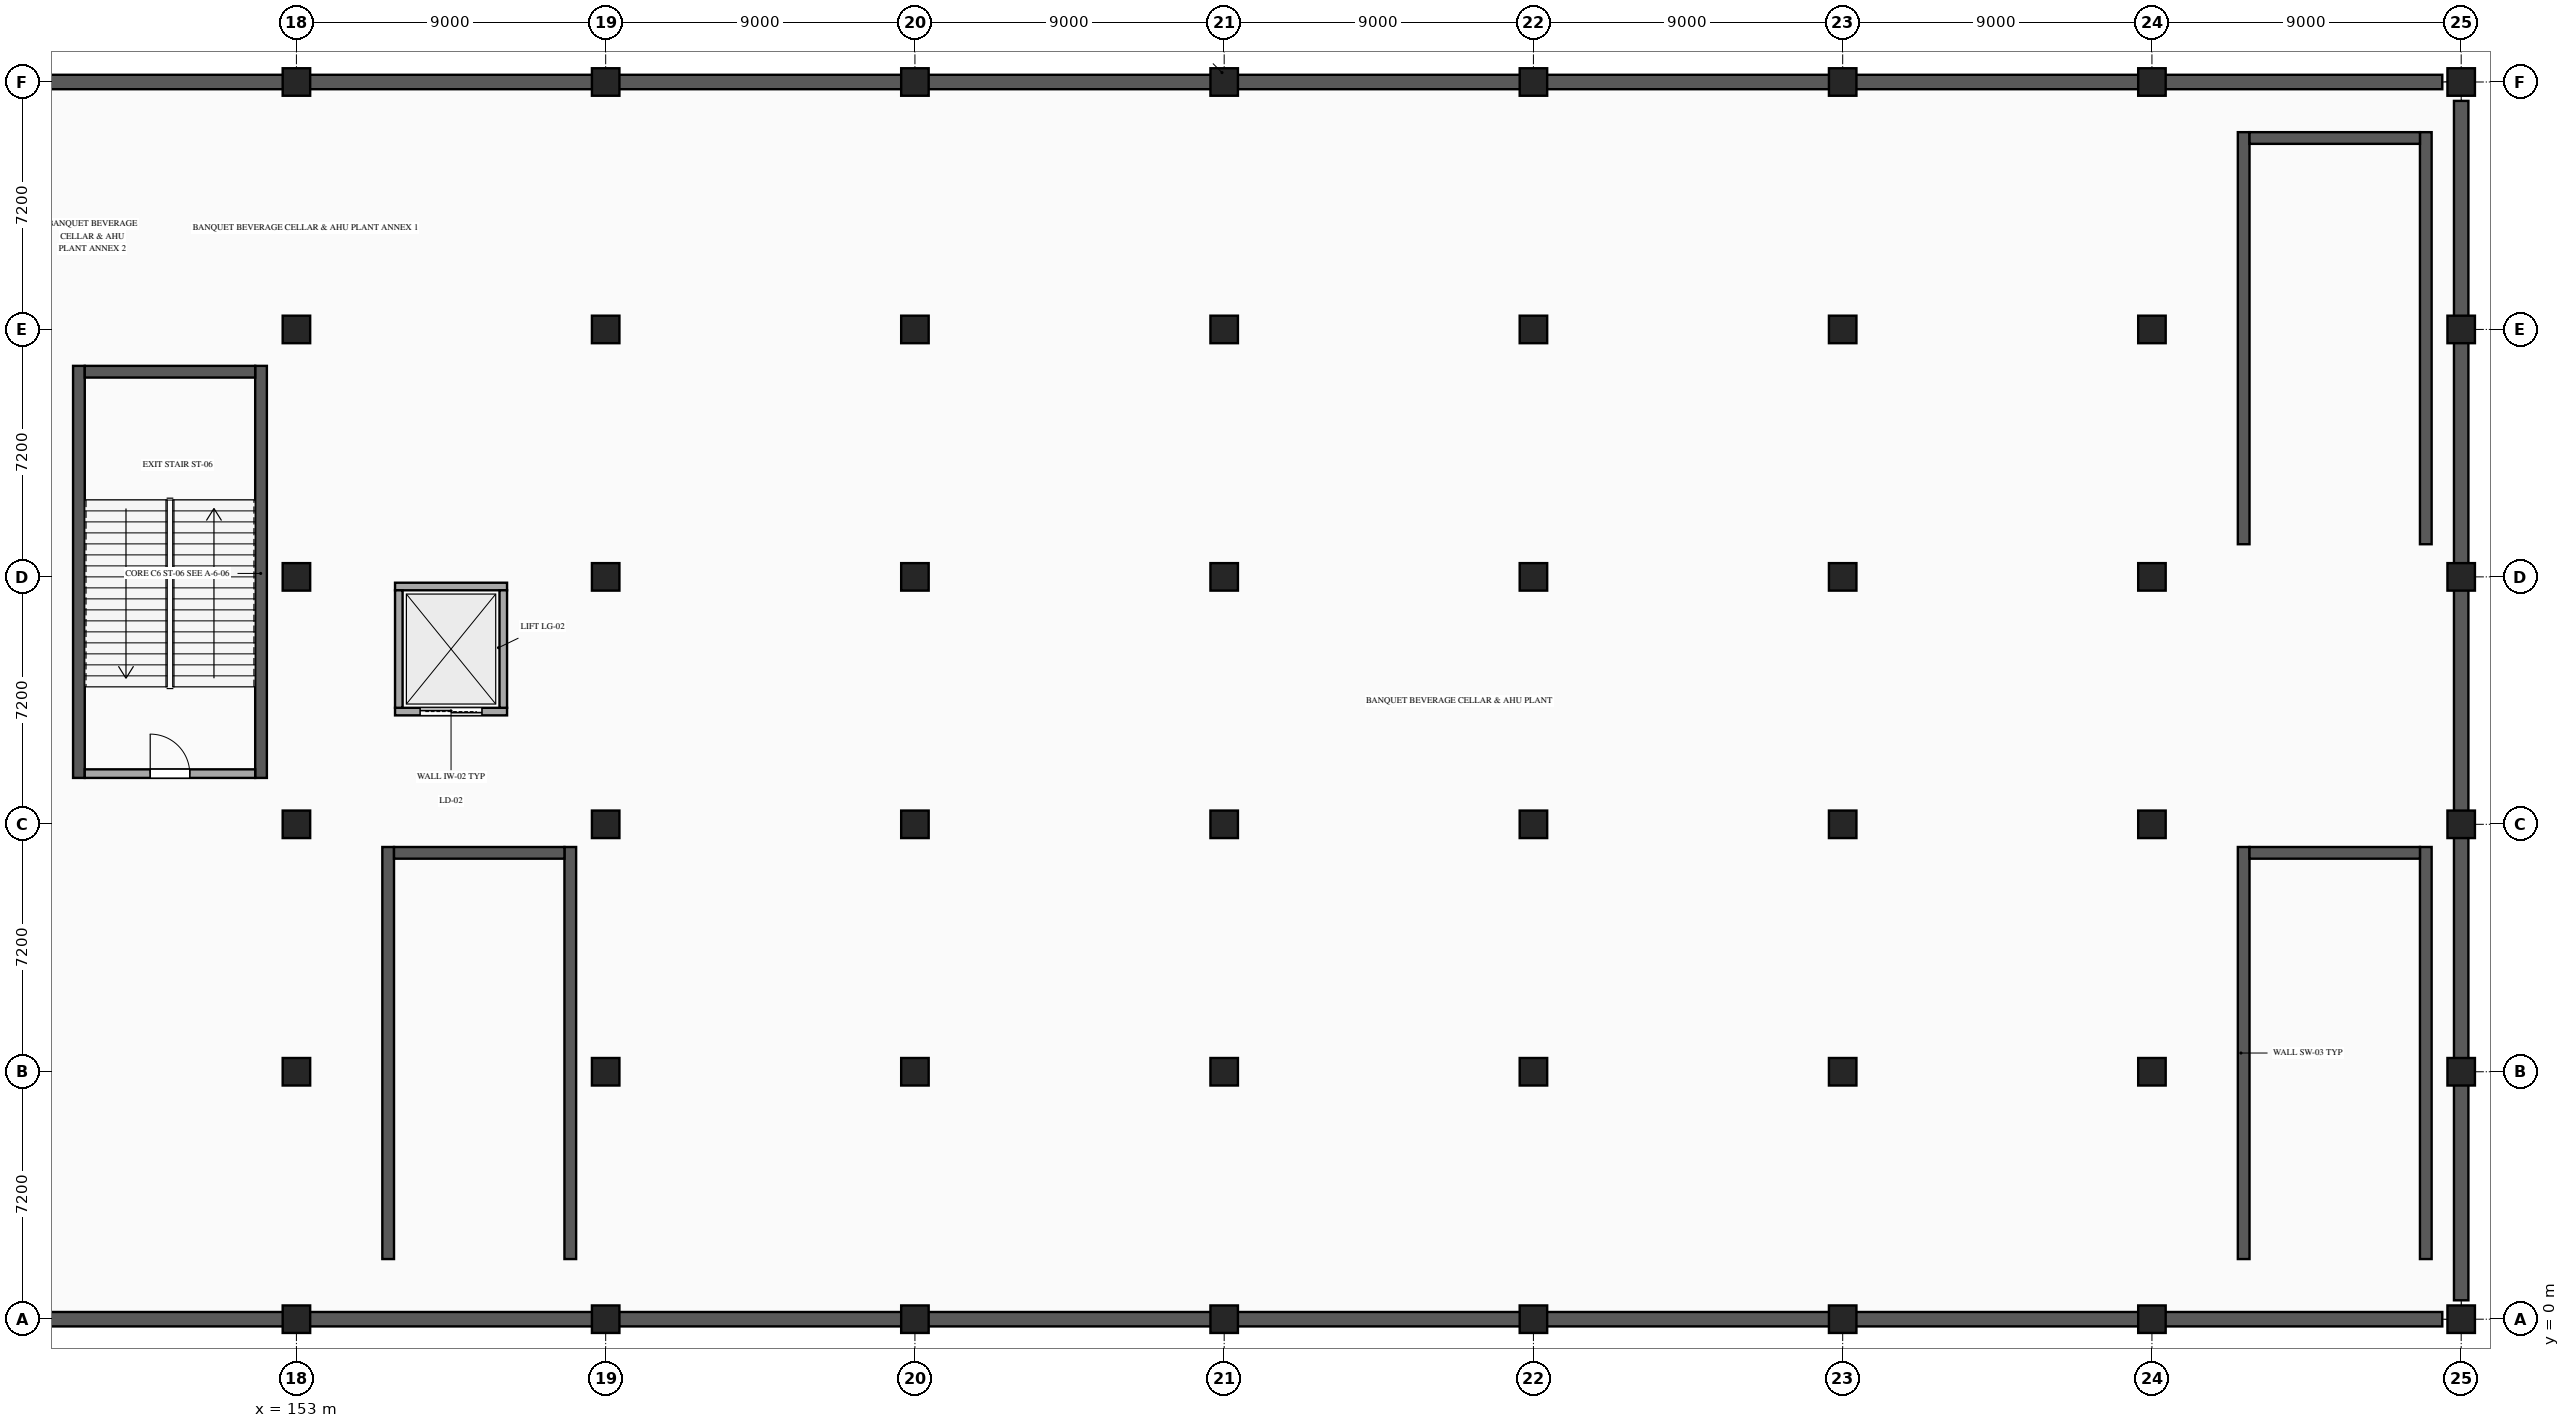
"""IFC4 building model, lengths in metres.
Left out: names, types, materials, properties, quantities, classifications, styles, units other than length and angle.
Written with IfcOpenShell. Run it as: python <this file> out.ifc"""

import sys

from ifc_helpers import new_model, si_unit, direction, frame, frame_2d, origin, origin_2d, place, context, subcontext, project, spatial, rectangle, extrude, element, fill, save


model = new_model("IFC4")
c1 = context("Model", 3, precision=1e-05, world=origin(), true_north=direction((0.0, 1.0)))
c2 = subcontext(c1, "Body", "Model", "MODEL_VIEW")
j1 = project(units=[si_unit("LENGTHUNIT", "METRE"), si_unit("PLANEANGLEUNIT", "RADIAN")], contexts=[c1])
p1 = place(None, origin())
s1 = spatial("IfcSite", under=j1, at=p1, CompositionType="ELEMENT")
p2 = place(p1, origin())
s2 = spatial("IfcBuilding", under=s1, at=p2, CompositionType="ELEMENT")
p3 = place(p2, frame((0.0, 0.0, -5.4)))
s3 = spatial("IfcBuildingStorey", under=s2, at=p3, CompositionType="ELEMENT", Elevation=-5.4)
for number, where, z_axis, x_axis in (
    (1, (153.0, 0.0, 0.0), (0.0, 0.0, 1.0), (1.0, 0.0, 0.0)),
    (2, (153.0, 7.2, 0.0), (0.0, 0.0, 1.0), (1.0, 0.0, 0.0)),
    (3, (153.0, 14.4, 0.0), (0.0, 0.0, 1.0), (1.0, 0.0, 0.0)),
    (4, (153.0, 21.6, 0.0), (0.0, 0.0, 1.0), (1.0, 0.0, 0.0)),
    (5, (153.0, 28.8, 0.0), (0.0, 0.0, 1.0), (1.0, 0.0, 0.0)),
    (6, (153.0, 36.0, 0.0), (0.0, 0.0, 1.0), (1.0, 0.0, 0.0)),
    (7, (162.0, 0.0, 0.0), (0.0, 0.0, 1.0), (1.0, 0.0, 0.0)),
    (8, (162.0, 7.2, 0.0), (0.0, 0.0, 1.0), (1.0, 0.0, 0.0)),
    (9, (162.0, 14.4, 0.0), (0.0, 0.0, 1.0), (1.0, 0.0, 0.0)),
    (10, (162.0, 21.6, 0.0), (0.0, 0.0, 1.0), (1.0, 0.0, 0.0)),
    (11, (162.0, 28.8, 0.0), (0.0, 0.0, 1.0), (1.0, 0.0, 0.0)),
    (12, (162.0, 36.0, 0.0), (0.0, 0.0, 1.0), (1.0, 0.0, 0.0)),
    (13, (171.0, 0.0, 0.0), (0.0, 0.0, 1.0), (1.0, 0.0, 0.0)),
    (14, (171.0, 7.2, 0.0), (0.0, 0.0, 1.0), (1.0, 0.0, 0.0)),
    (15, (171.0, 14.4, 0.0), (0.0, 0.0, 1.0), (1.0, 0.0, 0.0)),
    (16, (171.0, 21.6, 0.0), (0.0, 0.0, 1.0), (1.0, 0.0, 0.0)),
    (17, (171.0, 28.8, 0.0), (0.0, 0.0, 1.0), (1.0, 0.0, 0.0)),
    (18, (171.0, 36.0, 0.0), (0.0, 0.0, 1.0), (1.0, 0.0, 0.0)),
    (19, (180.0, 0.0, 0.0), (0.0, 0.0, 1.0), (1.0, 0.0, 0.0)),
    (20, (180.0, 7.2, 0.0), (0.0, 0.0, 1.0), (1.0, 0.0, 0.0)),
    (21, (180.0, 14.4, 0.0), (0.0, 0.0, 1.0), (1.0, 0.0, 0.0)),
    (22, (180.0, 21.6, 0.0), (0.0, 0.0, 1.0), (1.0, 0.0, 0.0)),
    (23, (180.0, 28.8, 0.0), (0.0, 0.0, 1.0), (1.0, 0.0, 0.0)),
    (24, (180.0, 36.0, 0.0), (0.0, 0.0, 1.0), (1.0, 0.0, 0.0)),
    (25, (189.0, 0.0, 0.0), (0.0, 0.0, 1.0), (1.0, 0.0, 0.0)),
    (26, (189.0, 7.2, 0.0), (0.0, 0.0, 1.0), (1.0, 0.0, 0.0)),
    (27, (189.0, 14.4, 0.0), (0.0, 0.0, 1.0), (1.0, 0.0, 0.0)),
    (28, (189.0, 21.6, 0.0), (0.0, 0.0, 1.0), (1.0, 0.0, 0.0)),
    (29, (189.0, 28.8, 0.0), (0.0, 0.0, 1.0), (1.0, 0.0, 0.0)),
    (30, (189.0, 36.0, 0.0), (0.0, 0.0, 1.0), (1.0, 0.0, 0.0)),
    (31, (198.0, 0.0, 0.0), (0.0, 0.0, 1.0), (1.0, 0.0, 0.0)),
    (32, (198.0, 7.2, 0.0), (0.0, 0.0, 1.0), (1.0, 0.0, 0.0)),
    (33, (198.0, 14.4, 0.0), (0.0, 0.0, 1.0), (1.0, 0.0, 0.0)),
    (34, (198.0, 21.6, 0.0), (0.0, 0.0, 1.0), (1.0, 0.0, 0.0)),
    (35, (198.0, 28.8, 0.0), (0.0, 0.0, 1.0), (1.0, 0.0, 0.0)),
    (36, (198.0, 36.0, 0.0), (0.0, 0.0, 1.0), (1.0, 0.0, 0.0)),
    (37, (207.0, 0.0, 0.0), (0.0, 0.0, 1.0), (1.0, 0.0, 0.0)),
    (38, (207.0, 7.2, 0.0), (0.0, 0.0, 1.0), (1.0, 0.0, 0.0)),
    (39, (207.0, 14.4, 0.0), (0.0, 0.0, 1.0), (1.0, 0.0, 0.0)),
    (40, (207.0, 21.6, 0.0), (0.0, 0.0, 1.0), (1.0, 0.0, 0.0)),
    (41, (207.0, 28.8, 0.0), (0.0, 0.0, 1.0), (1.0, 0.0, 0.0)),
    (42, (207.0, 36.0, 0.0), (0.0, 0.0, 1.0), (1.0, 0.0, 0.0)),
    (43, (216.0, 0.0, 0.0), (0.0, 0.0, 1.0), (1.0, 0.0, 0.0)),
    (44, (216.0, 7.2, 0.0), (0.0, 0.0, 1.0), (1.0, 0.0, 0.0)),
    (45, (216.0, 14.4, 0.0), (0.0, 0.0, 1.0), (1.0, 0.0, 0.0)),
    (46, (216.0, 21.6, 0.0), (0.0, 0.0, 1.0), (1.0, 0.0, 0.0)),
    (47, (216.0, 28.8, 0.0), (0.0, 0.0, 1.0), (1.0, 0.0, 0.0)),
    (48, (216.0, 36.0, 0.0), (0.0, 0.0, 1.0), (1.0, 0.0, 0.0)),
):
    element("IfcColumn", number, at=place(p3, frame(where, z_axis=z_axis, x_axis=x_axis)), inside=s3, PredefinedType="COLUMN", context=c2, shape_type="SweptSolid", body=[
        extrude(rectangle(XDim=0.8, YDim=0.8, at=origin_2d()), origin(), (0.0, 0.0, 1.0), 5.4),
    ])
p4 = place(p3, frame((144.55, 36.0, 0.0), z_axis=(0.0, 0.0, 1.0), x_axis=(1.0, 0.0, 0.0)))
e49 = element("IfcWall", 49, at=p4, inside=s3, PredefinedType="USERDEFINED", context=c2, shape_type="SweptSolid", body=[
    extrude(rectangle(XDim=70.9, YDim=0.42, at=frame_2d((35.45, 0.0))), origin(), (0.0, 0.0, 1.0), 4.08),
])
p5 = place(p3, frame((216.0, 35.45, 0.0), z_axis=(0.0, 0.0, 1.0), x_axis=(0.0, -1.0, 0.0)))
e50 = element("IfcWall", 50, at=p5, inside=s3, PredefinedType="USERDEFINED", context=c2, shape_type="SweptSolid", body=[
    extrude(rectangle(XDim=34.9, YDim=0.42, at=frame_2d((17.45, 0.0))), origin(), (0.0, 0.0, 1.0), 4.08),
])
p6 = place(p3, frame((215.45, 0.0, 0.0), z_axis=(0.0, 0.0, 1.0), x_axis=(-1.0, 0.0, 0.0)))
e51 = element("IfcWall", 51, at=p6, inside=s3, PredefinedType="USERDEFINED", context=c2, shape_type="SweptSolid", body=[
    extrude(rectangle(XDim=70.9, YDim=0.42, at=frame_2d((35.45, 0.0))), origin(), (0.0, 0.0, 1.0), 4.08),
])
for number, where, z_axis, x_axis in (
    (52, (146.67, 15.75, 0.0), (0.0, 0.0, 1.0), (0.0, 1.0, 0.0)),
    (53, (151.97, 27.74, 0.0), (0.0, 0.0, 1.0), (0.0, -1.0, 0.0)),
):
    element("IfcWall", number, at=place(p3, frame(where, z_axis=z_axis, x_axis=x_axis)), inside=s3, PredefinedType="SHEAR", context=c2, shape_type="SweptSolid", body=[
        extrude(rectangle(XDim=11.99, YDim=0.34, at=frame_2d((5.995, 0.0))), origin(), (0.0, 0.0, 1.0), 5.08),
    ])
p7 = place(p3, frame((146.84, 27.57, 0.0), z_axis=(0.0, 0.0, 1.0), x_axis=(1.0, 0.0, 0.0)))
e54 = element("IfcWall", 54, at=p7, inside=s3, PredefinedType="SHEAR", context=c2, shape_type="SweptSolid", body=[
    extrude(rectangle(XDim=4.96, YDim=0.34, at=frame_2d((2.48, 0.0))), origin(), (0.0, 0.0, 1.0), 5.08),
])
for number, where, z_axis, x_axis in (
    (55, (209.67, 1.75, 0.0), (0.0, 0.0, 1.0), (0.0, 1.0, 0.0)),
    (56, (214.97, 13.74, 0.0), (0.0, 0.0, 1.0), (0.0, -1.0, 0.0)),
):
    element("IfcWall", number, at=place(p3, frame(where, z_axis=z_axis, x_axis=x_axis)), inside=s3, PredefinedType="SHEAR", context=c2, shape_type="SweptSolid", body=[
        extrude(rectangle(XDim=11.99, YDim=0.34, at=frame_2d((5.995, 0.0))), origin(), (0.0, 0.0, 1.0), 5.08),
    ])
p8 = place(p3, frame((209.84, 13.57, 0.0), z_axis=(0.0, 0.0, 1.0), x_axis=(1.0, 0.0, 0.0)))
e57 = element("IfcWall", 57, at=p8, inside=s3, PredefinedType="SHEAR", context=c2, shape_type="SweptSolid", body=[
    extrude(rectangle(XDim=4.96, YDim=0.34, at=frame_2d((2.48, 0.0))), origin(), (0.0, 0.0, 1.0), 5.08),
])
for number, where, z_axis, x_axis in (
    (58, (209.67, 22.55, 0.0), (0.0, 0.0, 1.0), (0.0, 1.0, 0.0)),
    (59, (214.97, 34.54, 0.0), (0.0, 0.0, 1.0), (0.0, -1.0, 0.0)),
):
    element("IfcWall", number, at=place(p3, frame(where, z_axis=z_axis, x_axis=x_axis)), inside=s3, PredefinedType="SHEAR", context=c2, shape_type="SweptSolid", body=[
        extrude(rectangle(XDim=11.99, YDim=0.34, at=frame_2d((5.995, 0.0))), origin(), (0.0, 0.0, 1.0), 5.08),
    ])
p9 = place(p3, frame((209.84, 34.37, 0.0), z_axis=(0.0, 0.0, 1.0), x_axis=(1.0, 0.0, 0.0)))
e60 = element("IfcWall", 60, at=p9, inside=s3, PredefinedType="SHEAR", context=c2, shape_type="SweptSolid", body=[
    extrude(rectangle(XDim=4.96, YDim=0.34, at=frame_2d((2.48, 0.0))), origin(), (0.0, 0.0, 1.0), 5.08),
])
for number, where, z_axis, x_axis in (
    (61, (155.67, 1.75, 0.0), (0.0, 0.0, 1.0), (0.0, 1.0, 0.0)),
    (62, (160.97, 13.74, 0.0), (0.0, 0.0, 1.0), (0.0, -1.0, 0.0)),
):
    element("IfcWall", number, at=place(p3, frame(where, z_axis=z_axis, x_axis=x_axis)), inside=s3, PredefinedType="SHEAR", context=c2, shape_type="SweptSolid", body=[
        extrude(rectangle(XDim=11.99, YDim=0.34, at=frame_2d((5.995, 0.0))), origin(), (0.0, 0.0, 1.0), 5.08),
    ])
p10 = place(p3, frame((155.84, 13.57, 0.0), z_axis=(0.0, 0.0, 1.0), x_axis=(1.0, 0.0, 0.0)))
e63 = element("IfcWall", 63, at=p10, inside=s3, PredefinedType="SHEAR", context=c2, shape_type="SweptSolid", body=[
    extrude(rectangle(XDim=4.96, YDim=0.34, at=frame_2d((2.48, 0.0))), origin(), (0.0, 0.0, 1.0), 5.08),
])
p11 = place(p3, frame((146.84, 15.875, 0.0), z_axis=(0.0, 0.0, 1.0), x_axis=(1.0, 0.0, 0.0)))
e64 = element("IfcWall", 64, at=p11, inside=s3, PredefinedType="STANDARD", context=c2, shape_type="SweptSolid", body=[
    extrude(rectangle(XDim=4.96, YDim=0.25, at=frame_2d((2.48, 0.0))), origin(), (0.0, 0.0, 1.0), 4.95),
])
p12 = place(p11, frame((1.905, 0.0, 0.0)))
e65 = element("IfcOpeningElement", 65, at=p12, cuts=e64, PredefinedType="OPENING", context=c2, shape_type="SweptSolid", body=[
    extrude(rectangle(XDim=1.15, YDim=2.2, at=frame_2d((0.575, 1.1))), frame((0.0, 0.135, 0.0), z_axis=(0.0, -1.0, 0.0), x_axis=(1.0, 0.0, 0.0)), (0.0, 0.0, 1.0), 0.27),
])
p13 = place(p3, frame((155.87, 17.68, 0.0), z_axis=(0.0, 0.0, 1.0), x_axis=(1.0, 0.0, 0.0)))
e66 = element("IfcWall", 66, at=p13, inside=s3, PredefinedType="STANDARD", context=c2, shape_type="SweptSolid", body=[
    extrude(rectangle(XDim=3.26, YDim=0.22, at=frame_2d((1.63, 0.0))), origin(), (0.0, 0.0, 1.0), 4.707),
])
p14 = place(p13, frame((0.73, 0.0, 0.0)))
e67 = element("IfcOpeningElement", 67, at=p14, cuts=e66, PredefinedType="OPENING", context=c2, shape_type="SweptSolid", body=[
    extrude(rectangle(XDim=1.8, YDim=2.35, at=frame_2d((0.9, 1.175))), frame((0.0, 0.12, 0.0), z_axis=(0.0, -1.0, 0.0), x_axis=(1.0, 0.0, 0.0)), (0.0, 0.0, 1.0), 0.24),
])
p15 = place(p3, frame((159.13, 21.32, 0.0), z_axis=(0.0, 0.0, 1.0), x_axis=(-1.0, 0.0, 0.0)))
e68 = element("IfcWall", 68, at=p15, inside=s3, PredefinedType="STANDARD", context=c2, shape_type="SweptSolid", body=[
    extrude(rectangle(XDim=3.26, YDim=0.22, at=frame_2d((1.63, 0.0))), origin(), (0.0, 0.0, 1.0), 4.707),
])
for number, where, z_axis, x_axis in (
    (69, (155.98, 21.21, 0.0), (0.0, 0.0, 1.0), (0.0, -1.0, 0.0)),
    (70, (159.02, 17.79, 0.0), (0.0, 0.0, 1.0), (0.0, 1.0, 0.0)),
):
    element("IfcWall", number, at=place(p3, frame(where, z_axis=z_axis, x_axis=x_axis)), inside=s3, PredefinedType="STANDARD", context=c2, shape_type="SweptSolid", body=[
        extrude(rectangle(XDim=3.42, YDim=0.22, at=frame_2d((1.71, 0.0))), origin(), (0.0, 0.0, 1.0), 4.707),
    ])
p16 = place(p12, origin())
e71 = element("IfcDoor", 71, at=p16, inside=s3, OperationType="SINGLE_SWING_LEFT", PredefinedType="DOOR", context=c2, shape_type="SweptSolid", body=[
    extrude(rectangle(XDim=1.15, YDim=2.2, at=frame_2d((0.575, 1.1))), frame((0.0, 0.025, 0.0), z_axis=(0.0, -1.0, 0.0), x_axis=(1.0, 0.0, 0.0)), (0.0, 0.0, 1.0), 0.05),
])
fill(e65, e71)
p17 = place(p14, origin())
e72 = element("IfcDoor", 72, at=p17, inside=s3, OperationType="DOUBLE_DOOR_SLIDING", PredefinedType="DOOR", context=c2, shape_type="SweptSolid", body=[
    extrude(rectangle(XDim=1.8, YDim=2.35, at=frame_2d((0.9, 1.175))), frame((0.0, 0.025, 0.0), z_axis=(0.0, -1.0, 0.0), x_axis=(1.0, 0.0, 0.0)), (0.0, 0.0, 1.0), 0.05),
])
fill(e67, e72)
save(model, sys.argv[1])
